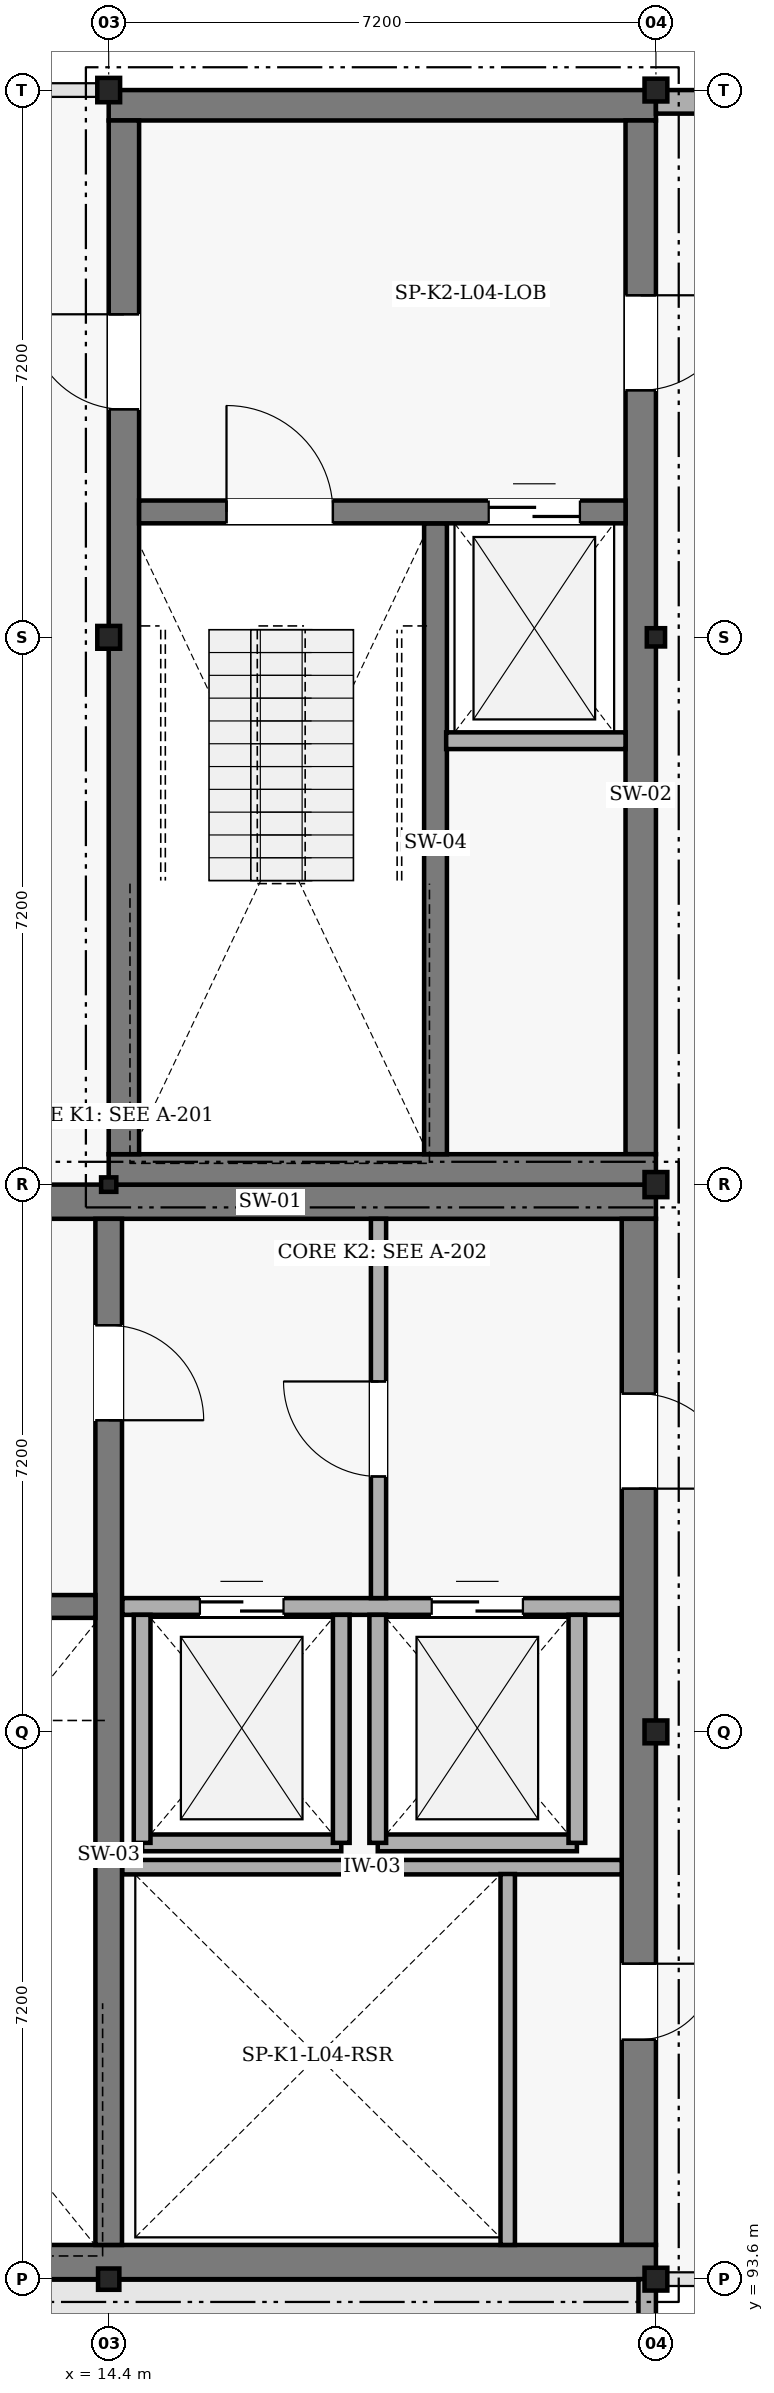
"""IFC4 building model, lengths in metres.
Left out: names, types, materials, properties, quantities, classifications, styles, units other than length and angle.
Written with IfcOpenShell. Run it as: python <this file> out.ifc"""

import sys

from ifc_helpers import new_model, si_unit, direction, frame, frame_2d, origin, origin_2d, place, context, subcontext, project, spatial, rectangle, hollow_rectangle, i_section, extrude, element, fill, save


model = new_model("IFC4")
c1 = context("Model", 3, precision=1e-05, world=origin(), true_north=direction((0.0, 1.0)))
c2 = subcontext(c1, "Body", "Model", "MODEL_VIEW")
j1 = project(units=[si_unit("LENGTHUNIT", "METRE"), si_unit("PLANEANGLEUNIT", "RADIAN")], contexts=[c1])
p1 = place(None, origin())
s1 = spatial("IfcSite", under=j1, at=p1, CompositionType="ELEMENT")
p2 = place(p1, origin())
s2 = spatial("IfcBuilding", under=s1, at=p2, CompositionType="ELEMENT")
p3 = place(p2, frame((0.0, 0.0, 18.0)))
s3 = spatial("IfcBuildingStorey", under=s2, at=p3, CompositionType="ELEMENT", Elevation=18.0)
p4 = place(p3, frame((7.2, 107.775, 0.0), z_axis=(0.0, 0.0, 1.0), x_axis=(1.0, 0.0, 0.0)))
e1 = element("IfcWall", 1, at=p4, inside=s3, PredefinedType="SHEAR", context=c2, shape_type="SweptSolid", body=[
    extrude(rectangle(XDim=14.4, YDim=0.45, at=frame_2d((7.2, 0.0))), origin(), (0.0, 0.0, 1.0), 3.6),
])
p5 = place(p4, frame((2.4, 0.0, 0.0)))
e2 = element("IfcOpeningElement", 2, at=p5, cuts=e1, PredefinedType="OPENING", context=c2, shape_type="SweptSolid", body=[
    extrude(rectangle(XDim=1.25, YDim=2.2, at=frame_2d((0.625, 1.1))), frame((0.0, 0.235, 0.0), z_axis=(0.0, -1.0, 0.0), x_axis=(1.0, 0.0, 0.0)), (0.0, 0.0, 1.0), 0.47),
])
p6 = place(p3, frame((21.375, 107.55, 0.0), z_axis=(0.0, 0.0, 1.0), x_axis=(0.0, -1.0, 0.0)))
e3 = element("IfcWall", 3, at=p6, inside=s3, PredefinedType="SHEAR", context=c2, shape_type="SweptSolid", body=[
    extrude(rectangle(XDim=13.5, YDim=0.45, at=frame_2d((6.75, 0.0))), origin(), (0.0, 0.0, 1.0), 3.6),
])
p7 = place(p6, frame((9.8, 0.0, 0.0)))
e4 = element("IfcOpeningElement", 4, at=p7, cuts=e3, PredefinedType="OPENING", context=c2, shape_type="SweptSolid", body=[
    extrude(rectangle(XDim=1.0, YDim=2.15, at=frame_2d((0.5, 1.075))), frame((0.0, 0.235, 0.0), z_axis=(0.0, -1.0, 0.0), x_axis=(1.0, 0.0, 0.0)), (0.0, 0.0, 1.0), 0.47),
])
p8 = place(p6, frame((2.3, 0.0, 0.0)))
e5 = element("IfcOpeningElement", 5, at=p8, cuts=e3, PredefinedType="OPENING", context=c2, shape_type="SweptSolid", body=[
    extrude(rectangle(XDim=1.25, YDim=2.2, at=frame_2d((0.625, 1.1))), frame((0.0, 0.235, 0.0), z_axis=(0.0, -1.0, 0.0), x_axis=(1.0, 0.0, 0.0)), (0.0, 0.0, 1.0), 0.47),
])
p9 = place(p3, frame((21.6, 93.825, 0.0), z_axis=(0.0, 0.0, 1.0), x_axis=(-1.0, 0.0, 0.0)))
e6 = element("IfcWall", 6, at=p9, inside=s3, PredefinedType="SHEAR", context=c2, shape_type="SweptSolid", body=[
    extrude(rectangle(XDim=14.4, YDim=0.45, at=frame_2d((7.2, 0.0))), origin(), (0.0, 0.0, 1.0), 3.6),
])
p10 = place(p3, frame((14.4, 107.55, 0.0), z_axis=(0.0, 0.0, 1.0), x_axis=(0.0, -1.0, 0.0)))
e7 = element("IfcWall", 7, at=p10, inside=s3, PredefinedType="SHEAR", context=c2, shape_type="SweptSolid", body=[
    extrude(rectangle(XDim=13.5, YDim=0.35, at=frame_2d((6.75, 0.0))), origin(), (0.0, 0.0, 1.0), 3.6),
])
p11 = place(p10, frame((1.4, 0.0, 0.0)))
e8 = element("IfcOpeningElement", 8, at=p11, cuts=e7, PredefinedType="OPENING", context=c2, shape_type="SweptSolid", body=[
    extrude(rectangle(XDim=1.25, YDim=2.2, at=frame_2d((0.625, 1.1))), frame((0.0, 0.185, 0.0), z_axis=(0.0, -1.0, 0.0), x_axis=(1.0, 0.0, 0.0)), (0.0, 0.0, 1.0), 0.37),
])
p12 = place(p3, frame((7.65, 102.45, 0.0), z_axis=(0.0, 0.0, 1.0), x_axis=(1.0, 0.0, 0.0)))
e9 = element("IfcWall", 9, at=p12, inside=s3, PredefinedType="SHEAR", context=c2, shape_type="SweptSolid", body=[
    extrude(rectangle(XDim=6.575, YDim=0.3, at=frame_2d((3.288, 0.0))), origin(), (0.0, 0.0, 1.0), 3.6),
])
p13 = place(p12, frame((2.788, 0.0, 0.0)))
e10 = element("IfcOpeningElement", 10, at=p13, cuts=e9, PredefinedType="OPENING", context=c2, shape_type="SweptSolid", body=[
    extrude(rectangle(XDim=1.4, YDim=2.2, at=frame_2d((0.7, 1.1))), frame((0.0, 0.16, 0.0), z_axis=(0.0, -1.0, 0.0), x_axis=(1.0, 0.0, 0.0)), (0.0, 0.0, 1.0), 0.32),
])
p14 = place(p3, frame((14.4, 122.2, 0.0), z_axis=(0.0, 0.0, 1.0), x_axis=(1.0, 0.0, 0.0)))
e11 = element("IfcWall", 11, at=p14, inside=s3, PredefinedType="SHEAR", context=c2, shape_type="SweptSolid", body=[
    extrude(rectangle(XDim=7.2, YDim=0.4, at=frame_2d((3.6, 0.0))), origin(), (0.0, 0.0, 1.0), 3.6),
])
p15 = place(p3, frame((21.4, 122.0, 0.0), z_axis=(0.0, 0.0, 1.0), x_axis=(0.0, -1.0, 0.0)))
e12 = element("IfcWall", 12, at=p15, inside=s3, PredefinedType="SHEAR", context=c2, shape_type="SweptSolid", body=[
    extrude(rectangle(XDim=13.6, YDim=0.4, at=frame_2d((6.8, 0.0))), origin(), (0.0, 0.0, 1.0), 3.6),
])
p16 = place(p15, frame((2.3, 0.0, 0.0)))
e13 = element("IfcOpeningElement", 13, at=p16, cuts=e12, PredefinedType="OPENING", context=c2, shape_type="SweptSolid", body=[
    extrude(rectangle(XDim=1.25, YDim=2.2, at=frame_2d((0.625, 1.1))), frame((0.0, 0.21, 0.0), z_axis=(0.0, -1.0, 0.0), x_axis=(1.0, 0.0, 0.0)), (0.0, 0.0, 1.0), 0.42),
])
p17 = place(p3, frame((21.6, 108.2, 0.0), z_axis=(0.0, 0.0, 1.0), x_axis=(-1.0, 0.0, 0.0)))
e14 = element("IfcWall", 14, at=p17, inside=s3, PredefinedType="SHEAR", context=c2, shape_type="SweptSolid", body=[
    extrude(rectangle(XDim=7.2, YDim=0.4, at=frame_2d((3.6, 0.0))), origin(), (0.0, 0.0, 1.0), 3.6),
])
p18 = place(p3, frame((14.6, 108.4, 0.0), z_axis=(0.0, 0.0, 1.0), x_axis=(0.0, 1.0, 0.0)))
e15 = element("IfcWall", 15, at=p18, inside=s3, PredefinedType="SHEAR", context=c2, shape_type="SweptSolid", body=[
    extrude(rectangle(XDim=13.6, YDim=0.4, at=frame_2d((6.8, 0.0))), origin(), (0.0, 0.0, 1.0), 3.6),
])
p19 = place(p18, frame((9.8, 0.0, 0.0)))
e16 = element("IfcOpeningElement", 16, at=p19, cuts=e15, PredefinedType="OPENING", context=c2, shape_type="SweptSolid", body=[
    extrude(rectangle(XDim=1.25, YDim=2.2, at=frame_2d((0.625, 1.1))), frame((0.0, 0.21, 0.0), z_axis=(0.0, -1.0, 0.0), x_axis=(1.0, 0.0, 0.0)), (0.0, 0.0, 1.0), 0.42),
])
p20 = place(p3, frame((18.7, 116.7, 0.0), z_axis=(0.0, 0.0, 1.0), x_axis=(0.0, -1.0, 0.0)))
e17 = element("IfcWall", 17, at=p20, inside=s3, PredefinedType="SHEAR", context=c2, shape_type="SweptSolid", body=[
    extrude(rectangle(XDim=8.3, YDim=0.3, at=frame_2d((4.15, 0.0))), origin(), (0.0, 0.0, 1.0), 3.6),
])
p21 = place(p3, frame((14.8, 116.85, 0.0), z_axis=(0.0, 0.0, 1.0), x_axis=(1.0, 0.0, 0.0)))
e18 = element("IfcWall", 18, at=p21, inside=s3, PredefinedType="SHEAR", context=c2, shape_type="SweptSolid", body=[
    extrude(rectangle(XDim=6.4, YDim=0.3, at=frame_2d((3.2, 0.0))), origin(), (0.0, 0.0, 1.0), 3.6),
])
p22 = place(p21, frame((1.15, 0.0, 0.0)))
e19 = element("IfcOpeningElement", 19, at=p22, cuts=e18, PredefinedType="OPENING", context=c2, shape_type="SweptSolid", body=[
    extrude(rectangle(XDim=1.4, YDim=2.2, at=frame_2d((0.7, 1.1))), frame((0.0, 0.16, 0.0), z_axis=(0.0, -1.0, 0.0), x_axis=(1.0, 0.0, 0.0)), (0.0, 0.0, 1.0), 0.32),
])
p23 = place(p21, frame((4.6, 0.0, 0.0)))
e20 = element("IfcOpeningElement", 20, at=p23, cuts=e18, PredefinedType="OPENING", context=c2, shape_type="SweptSolid", body=[
    extrude(rectangle(XDim=1.2, YDim=2.15, at=frame_2d((0.6, 1.075))), frame((0.0, 0.16, 0.0), z_axis=(0.0, -1.0, 0.0), x_axis=(1.0, 0.0, 0.0)), (0.0, 0.0, 1.0), 0.32),
])
p24 = place(p3, frame((14.4, 93.6, 0.0), z_axis=(0.0, 0.0, 1.0), x_axis=(1.0, 0.0, 0.0)))
e21 = element("IfcColumn", 21, at=p24, inside=s3, PredefinedType="COLUMN", context=c2, shape_type="SweptSolid", body=[
    extrude(i_section(OverallWidth=0.28, OverallDepth=0.28, WebThickness=0.01, FlangeThickness=0.018, FilletRadius=0.024, at=origin_2d()), origin(), (0.0, 0.0, 1.0), 3.3),
])
p25 = place(p3, frame((14.4, 108.0, 0.0), z_axis=(0.0, 0.0, 1.0), x_axis=(1.0, 0.0, 0.0)))
e22 = element("IfcColumn", 22, at=p25, inside=s3, PredefinedType="COLUMN", context=c2, shape_type="SweptSolid", body=[
    extrude(i_section(OverallWidth=0.2, OverallDepth=0.19, WebThickness=0.007, FlangeThickness=0.01, FilletRadius=0.018, at=origin_2d()), origin(), (0.0, 0.0, 1.0), 3.3),
])
p26 = place(p3, frame((14.4, 115.2, 0.0), z_axis=(0.0, 0.0, 1.0), x_axis=(1.0, 0.0, 0.0)))
e23 = element("IfcColumn", 23, at=p26, inside=s3, PredefinedType="COLUMN", context=c2, shape_type="SweptSolid", body=[
    extrude(hollow_rectangle(XDim=0.3, YDim=0.3, WallThickness=0.012, at=origin_2d()), origin(), (0.0, 0.0, 1.0), 3.3),
])
p27 = place(p3, frame((14.4, 122.4, 0.0), z_axis=(0.0, 0.0, 1.0), x_axis=(1.0, 0.0, 0.0)))
e24 = element("IfcColumn", 24, at=p27, inside=s3, PredefinedType="COLUMN", context=c2, shape_type="SweptSolid", body=[
    extrude(i_section(OverallWidth=0.3, OverallDepth=0.32, WebThickness=0.011, FlangeThickness=0.021, FilletRadius=0.027, at=origin_2d()), origin(), (0.0, 0.0, 1.0), 3.3),
])
for number, where, z_axis, x_axis in (
    (25, (21.6, 93.6, 0.0), (0.0, 0.0, 1.0), (1.0, 0.0, 0.0)),
    (26, (21.6, 100.8, 0.0), (0.0, 0.0, 1.0), (1.0, 0.0, 0.0)),
):
    element("IfcColumn", number, at=place(p3, frame(where, z_axis=z_axis, x_axis=x_axis)), inside=s3, PredefinedType="COLUMN", context=c2, shape_type="SweptSolid", body=[
        extrude(hollow_rectangle(XDim=0.3, YDim=0.3, WallThickness=0.012, at=origin_2d()), origin(), (0.0, 0.0, 1.0), 3.3),
    ])
p28 = place(p3, frame((21.6, 108.0, 0.0), z_axis=(0.0, 0.0, 1.0), x_axis=(1.0, 0.0, 0.0)))
e27 = element("IfcColumn", 27, at=p28, inside=s3, PredefinedType="COLUMN", context=c2, shape_type="SweptSolid", body=[
    extrude(i_section(OverallWidth=0.3, OverallDepth=0.33, WebThickness=0.01, FlangeThickness=0.017, FilletRadius=0.027, at=origin_2d()), origin(), (0.0, 0.0, 1.0), 3.3),
])
p29 = place(p3, frame((21.6, 115.2, 0.0), z_axis=(0.0, 0.0, 1.0), x_axis=(1.0, 0.0, 0.0)))
e28 = element("IfcColumn", 28, at=p29, inside=s3, PredefinedType="COLUMN", context=c2, shape_type="SweptSolid", body=[
    extrude(i_section(OverallWidth=0.24, OverallDepth=0.24, WebThickness=0.01, FlangeThickness=0.017, FilletRadius=0.021, at=origin_2d()), origin(), (0.0, 0.0, 1.0), 3.3),
])
p30 = place(p3, frame((21.6, 122.4, 0.0), z_axis=(0.0, 0.0, 1.0), x_axis=(1.0, 0.0, 0.0)))
e29 = element("IfcColumn", 29, at=p30, inside=s3, PredefinedType="COLUMN", context=c2, shape_type="SweptSolid", body=[
    extrude(hollow_rectangle(XDim=0.3, YDim=0.3, WallThickness=0.012, at=origin_2d()), origin(), (0.0, 0.0, 1.0), 3.3),
])
p31 = place(p3, frame((21.6, 122.245, 0.0), z_axis=(0.0, 0.0, 1.0), x_axis=(1.0, 0.0, 0.0)))
e30 = element("IfcWall", 30, at=p31, inside=s3, PredefinedType="SOLIDWALL", context=c2, shape_type="SweptSolid", body=[
    extrude(rectangle(XDim=7.2, YDim=0.31, at=frame_2d((3.6, 0.0))), origin(), (0.0, 0.0, 1.0), 3.0),
])
p32 = place(p31, frame((2.15, 0.0, 0.9)))
e31 = element("IfcOpeningElement", 31, at=p32, cuts=e30, PredefinedType="OPENING", context=c2, shape_type="SweptSolid", body=[
    extrude(rectangle(XDim=2.9, YDim=1.7, at=frame_2d((1.45, 0.85))), frame((0.0, 0.165, 0.0), z_axis=(0.0, -1.0, 0.0), x_axis=(1.0, 0.0, 0.0)), (0.0, 0.0, 1.0), 0.33),
])
p33 = place(p3, frame((21.485, 72.0, 0.0), z_axis=(0.0, 0.0, 1.0), x_axis=(0.0, 1.0, 0.0)))
e32 = element("IfcWall", 32, at=p33, inside=s3, PredefinedType="PARAPET", context=c2, shape_type="SweptSolid", body=[
    extrude(rectangle(XDim=21.6, YDim=0.23, at=frame_2d((10.8, 0.0))), origin(), (0.0, 0.0, 1.0), 0.55),
])
p34 = place(p3, frame((14.58, 99.02, 0.0), z_axis=(0.0, 0.0, 1.0), x_axis=(1.0, 0.0, 0.0)))
e33 = element("IfcWall", 33, at=p34, inside=s3, PredefinedType="PARTITIONING", context=c2, shape_type="SweptSolid", body=[
    extrude(rectangle(XDim=6.57, YDim=0.19, at=frame_2d((3.285, 0.0))), origin(), (0.0, 0.0, 1.0), 3.25),
])
p35 = place(p3, frame((19.65, 94.05, 0.0), z_axis=(0.0, 0.0, 1.0), x_axis=(0.0, 1.0, 0.0)))
e34 = element("IfcWall", 34, at=p35, inside=s3, PredefinedType="PARTITIONING", context=c2, shape_type="SweptSolid", body=[
    extrude(rectangle(XDim=4.88, YDim=0.19, at=frame_2d((2.44, 0.0))), origin(), (0.0, 0.0, 1.0), 3.25),
])
p36 = place(p3, frame((14.58, 102.45, 0.0), z_axis=(0.0, 0.0, 1.0), x_axis=(1.0, 0.0, 0.0)))
e35 = element("IfcWall", 35, at=p36, inside=s3, PredefinedType="PARTITIONING", context=c2, shape_type="SweptSolid", body=[
    extrude(rectangle(XDim=6.57, YDim=0.22, at=frame_2d((3.285, 0.0))), origin(), (0.0, 0.0, 1.0), 3.25),
])
p37 = place(p36, frame((1.02, 0.0, 0.0)))
e36 = element("IfcOpeningElement", 36, at=p37, cuts=e35, PredefinedType="OPENING", context=c2, shape_type="SweptSolid", body=[
    extrude(rectangle(XDim=1.1, YDim=2.15, at=frame_2d((0.55, 1.075))), frame((0.0, 0.12, 0.0), z_axis=(0.0, -1.0, 0.0), x_axis=(1.0, 0.0, 0.0)), (0.0, 0.0, 1.0), 0.24),
])
p38 = place(p36, frame((4.07, 0.0, 0.0)))
e37 = element("IfcOpeningElement", 37, at=p38, cuts=e35, PredefinedType="OPENING", context=c2, shape_type="SweptSolid", body=[
    extrude(rectangle(XDim=1.2, YDim=2.15, at=frame_2d((0.6, 1.075))), frame((0.0, 0.12, 0.0), z_axis=(0.0, -1.0, 0.0), x_axis=(1.0, 0.0, 0.0)), (0.0, 0.0, 1.0), 0.24),
])
p39 = place(p3, frame((14.84, 99.34, 0.0), z_axis=(0.0, 0.0, 1.0), x_axis=(1.0, 0.0, 0.0)))
e38 = element("IfcWall", 38, at=p39, inside=s3, PredefinedType="PARTITIONING", context=c2, shape_type="SweptSolid", body=[
    extrude(rectangle(XDim=2.62, YDim=0.22, at=frame_2d((1.31, 0.0))), origin(), (0.0, 0.0, 1.0), 3.25),
])
for number, where, z_axis, x_axis in (
    (39, (14.84, 99.34, 0.0), (0.0, 0.0, 1.0), (0.0, 1.0, 0.0)),
    (40, (17.46, 99.34, 0.0), (0.0, 0.0, 1.0), (0.0, 1.0, 0.0)),
):
    element("IfcWall", number, at=place(p3, frame(where, z_axis=z_axis, x_axis=x_axis)), inside=s3, PredefinedType="PARTITIONING", context=c2, shape_type="SweptSolid", body=[
        extrude(rectangle(XDim=3.0, YDim=0.22, at=frame_2d((1.5, 0.0))), origin(), (0.0, 0.0, 1.0), 3.25),
    ])
p40 = place(p3, frame((17.94, 99.34, 0.0), z_axis=(0.0, 0.0, 1.0), x_axis=(1.0, 0.0, 0.0)))
e41 = element("IfcWall", 41, at=p40, inside=s3, PredefinedType="PARTITIONING", context=c2, shape_type="SweptSolid", body=[
    extrude(rectangle(XDim=2.62, YDim=0.22, at=frame_2d((1.31, 0.0))), origin(), (0.0, 0.0, 1.0), 3.25),
])
for number, where, z_axis, x_axis in (
    (42, (17.94, 99.34, 0.0), (0.0, 0.0, 1.0), (0.0, 1.0, 0.0)),
    (43, (20.56, 99.34, 0.0), (0.0, 0.0, 1.0), (0.0, 1.0, 0.0)),
):
    element("IfcWall", number, at=place(p3, frame(where, z_axis=z_axis, x_axis=x_axis)), inside=s3, PredefinedType="PARTITIONING", context=c2, shape_type="SweptSolid", body=[
        extrude(rectangle(XDim=3.0, YDim=0.22, at=frame_2d((1.5, 0.0))), origin(), (0.0, 0.0, 1.0), 3.25),
    ])
p41 = place(p3, frame((17.95, 102.56, 0.0), z_axis=(0.0, 0.0, 1.0), x_axis=(0.0, 1.0, 0.0)))
e44 = element("IfcWall", 44, at=p41, inside=s3, PredefinedType="PARTITIONING", context=c2, shape_type="SweptSolid", body=[
    extrude(rectangle(XDim=4.99, YDim=0.2, at=frame_2d((2.495, 0.0))), origin(), (0.0, 0.0, 1.0), 3.25),
])
p42 = place(p41, frame((1.6, 0.0, 0.0)))
e45 = element("IfcOpeningElement", 45, at=p42, cuts=e44, PredefinedType="OPENING", context=c2, shape_type="SweptSolid", body=[
    extrude(rectangle(XDim=1.25, YDim=2.2, at=frame_2d((0.625, 1.1))), frame((0.0, 0.11, 0.0), z_axis=(0.0, -1.0, 0.0), x_axis=(1.0, 0.0, 0.0)), (0.0, 0.0, 1.0), 0.22),
])
p43 = place(p3, frame((18.84, 113.84, 0.0), z_axis=(0.0, 0.0, 1.0), x_axis=(1.0, 0.0, 0.0)))
e46 = element("IfcWall", 46, at=p43, inside=s3, PredefinedType="PARTITIONING", context=c2, shape_type="SweptSolid", body=[
    extrude(rectangle(XDim=2.36, YDim=0.22, at=frame_2d((1.18, 0.0))), origin(), (0.0, 0.0, 1.0), 3.25),
])
p44 = place(p11, origin())
e47 = element("IfcDoor", 47, at=p44, inside=s3, OperationType="SINGLE_SWING_RIGHT", PredefinedType="DOOR", context=c2, shape_type="SweptSolid", body=[
    extrude(rectangle(XDim=1.25, YDim=2.2, at=frame_2d((0.625, 1.1))), frame((0.0, 0.025, 0.0), z_axis=(0.0, -1.0, 0.0), x_axis=(1.0, 0.0, 0.0)), (0.0, 0.0, 1.0), 0.05),
])
fill(e8, e47)
p45 = place(p7, origin())
e48 = element("IfcDoor", 48, at=p45, inside=s3, OperationType="SINGLE_SWING_LEFT", PredefinedType="DOOR", context=c2, shape_type="SweptSolid", body=[
    extrude(rectangle(XDim=1.0, YDim=2.15, at=frame_2d((0.5, 1.075))), frame((0.0, 0.025, 0.0), z_axis=(0.0, -1.0, 0.0), x_axis=(1.0, 0.0, 0.0)), (0.0, 0.0, 1.0), 0.05),
])
fill(e4, e48)
p46 = place(p37, origin())
e49 = element("IfcDoor", 49, at=p46, inside=s3, OperationType="DOUBLE_DOOR_SLIDING", PredefinedType="DOOR", context=c2, shape_type="SweptSolid", body=[
    extrude(rectangle(XDim=1.1, YDim=2.15, at=frame_2d((0.55, 1.075))), frame((0.0, 0.025, 0.0), z_axis=(0.0, -1.0, 0.0), x_axis=(1.0, 0.0, 0.0)), (0.0, 0.0, 1.0), 0.05),
])
fill(e36, e49)
p47 = place(p38, origin())
e50 = element("IfcDoor", 50, at=p47, inside=s3, OperationType="DOUBLE_DOOR_SLIDING", PredefinedType="DOOR", context=c2, shape_type="SweptSolid", body=[
    extrude(rectangle(XDim=1.2, YDim=2.15, at=frame_2d((0.6, 1.075))), frame((0.0, 0.025, 0.0), z_axis=(0.0, -1.0, 0.0), x_axis=(1.0, 0.0, 0.0)), (0.0, 0.0, 1.0), 0.05),
])
fill(e37, e50)
p48 = place(p42, origin())
e51 = element("IfcDoor", 51, at=p48, inside=s3, OperationType="SINGLE_SWING_RIGHT", PredefinedType="DOOR", context=c2, shape_type="SweptSolid", body=[
    extrude(rectangle(XDim=1.25, YDim=2.2, at=frame_2d((0.625, 1.1))), frame((0.0, 0.025, 0.0), z_axis=(0.0, -1.0, 0.0), x_axis=(1.0, 0.0, 0.0)), (0.0, 0.0, 1.0), 0.05),
])
fill(e45, e51)
p49 = place(p8, origin())
e52 = element("IfcDoor", 52, at=p49, inside=s3, OperationType="SINGLE_SWING_RIGHT", PredefinedType="DOOR", context=c2, shape_type="SweptSolid", body=[
    extrude(rectangle(XDim=1.25, YDim=2.2, at=frame_2d((0.625, 1.1))), frame((0.0, 0.025, 0.0), z_axis=(0.0, -1.0, 0.0), x_axis=(1.0, 0.0, 0.0)), (0.0, 0.0, 1.0), 0.05),
])
fill(e5, e52)
p50 = place(p22, origin())
e53 = element("IfcDoor", 53, at=p50, inside=s3, OperationType="SINGLE_SWING_LEFT", PredefinedType="DOOR", context=c2, shape_type="SweptSolid", body=[
    extrude(rectangle(XDim=1.4, YDim=2.2, at=frame_2d((0.7, 1.1))), frame((0.0, 0.025, 0.0), z_axis=(0.0, -1.0, 0.0), x_axis=(1.0, 0.0, 0.0)), (0.0, 0.0, 1.0), 0.05),
])
fill(e19, e53)
p51 = place(p23, origin())
e54 = element("IfcDoor", 54, at=p51, inside=s3, OperationType="DOUBLE_DOOR_SLIDING", PredefinedType="DOOR", context=c2, shape_type="SweptSolid", body=[
    extrude(rectangle(XDim=1.2, YDim=2.15, at=frame_2d((0.6, 1.075))), frame((0.0, 0.025, 0.0), z_axis=(0.0, -1.0, 0.0), x_axis=(1.0, 0.0, 0.0)), (0.0, 0.0, 1.0), 0.05),
])
fill(e20, e54)
p52 = place(p19, origin())
e55 = element("IfcDoor", 55, at=p52, inside=s3, OperationType="SINGLE_SWING_RIGHT", PredefinedType="DOOR", context=c2, shape_type="SweptSolid", body=[
    extrude(rectangle(XDim=1.25, YDim=2.2, at=frame_2d((0.625, 1.1))), frame((0.0, 0.025, 0.0), z_axis=(0.0, -1.0, 0.0), x_axis=(1.0, 0.0, 0.0)), (0.0, 0.0, 1.0), 0.05),
])
fill(e16, e55)
p53 = place(p16, origin())
e56 = element("IfcDoor", 56, at=p53, inside=s3, OperationType="SINGLE_SWING_LEFT", PredefinedType="DOOR", context=c2, shape_type="SweptSolid", body=[
    extrude(rectangle(XDim=1.25, YDim=2.2, at=frame_2d((0.625, 1.1))), frame((0.0, 0.025, 0.0), z_axis=(0.0, -1.0, 0.0), x_axis=(1.0, 0.0, 0.0)), (0.0, 0.0, 1.0), 0.05),
])
fill(e13, e56)
save(model, sys.argv[1])
